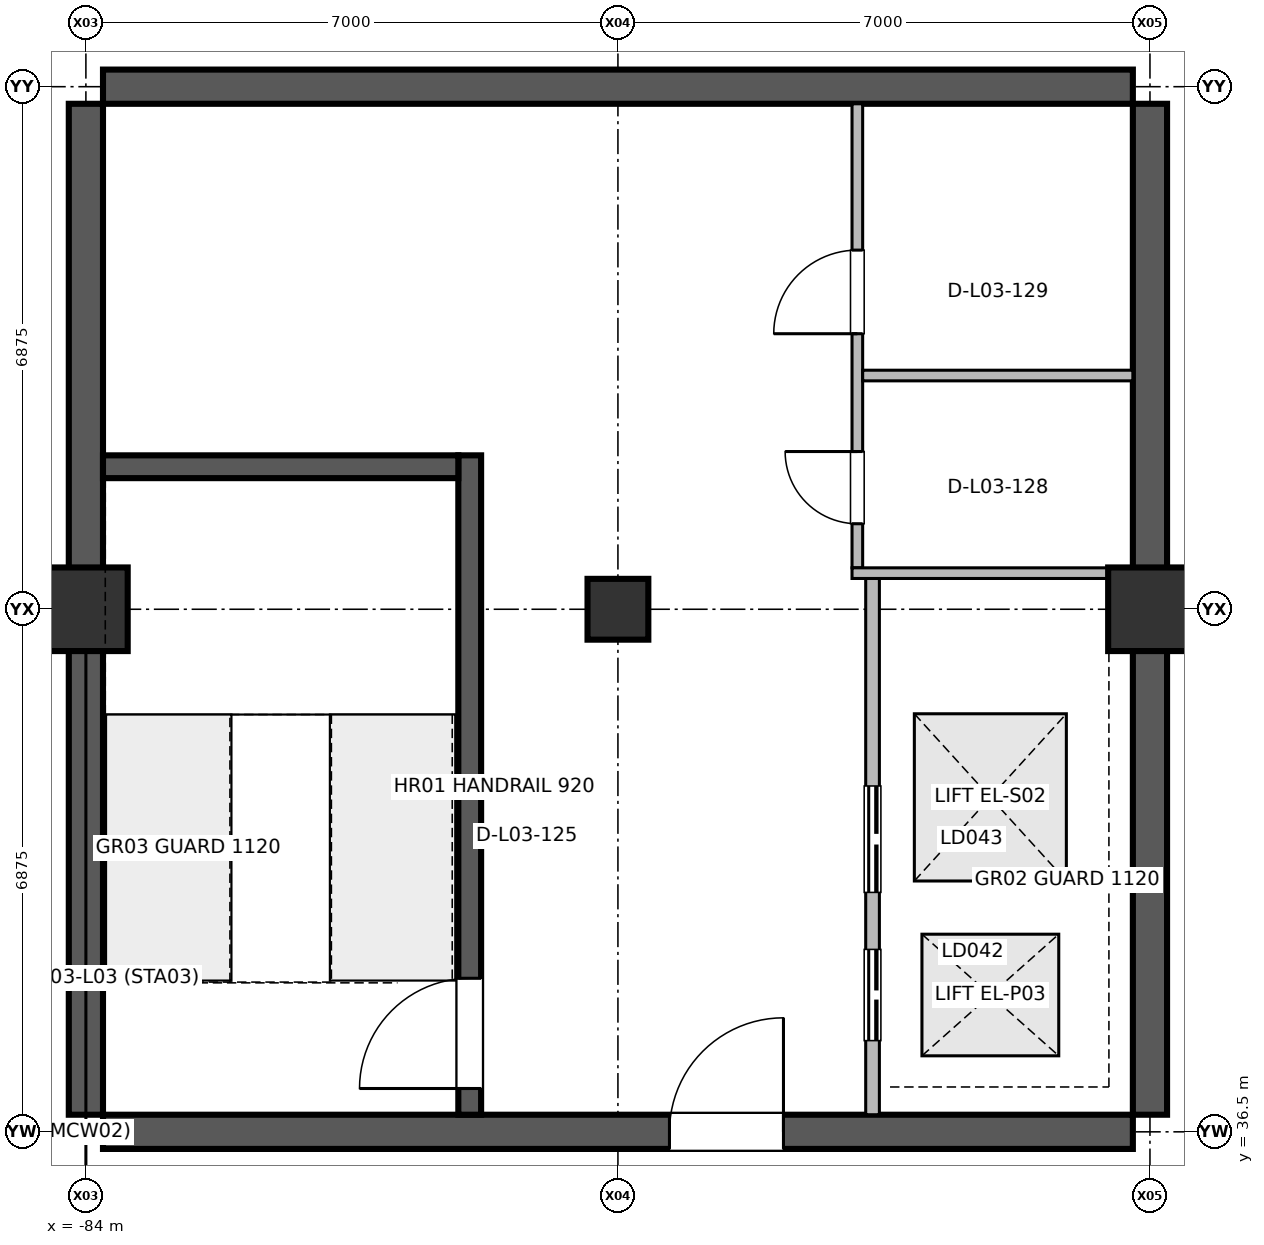
"""IFC4 building model, lengths in metres.
Left out: names, types, materials, properties, quantities, classifications, styles, units other than length and angle.
Written with IfcOpenShell. Run it as: python <this file> out.ifc"""

import sys

from ifc_helpers import new_model, si_unit, direction, frame, frame_2d, origin, origin_2d, place, context, subcontext, project, spatial, rectangle, extrude, element, fill, save


model = new_model("IFC4")
c1 = context("Model", 3, precision=1e-05, world=origin(), true_north=direction((0.0, 1.0)))
c2 = subcontext(c1, "Body", "Model", "MODEL_VIEW")
j1 = project(units=[si_unit("LENGTHUNIT", "METRE"), si_unit("PLANEANGLEUNIT", "RADIAN")], contexts=[c1])
p1 = place(None, origin())
s1 = spatial("IfcSite", under=j1, at=p1, CompositionType="ELEMENT")
p2 = place(p1, origin())
s2 = spatial("IfcBuilding", under=s1, at=p2, CompositionType="ELEMENT")
p3 = place(p2, frame((0.0, 0.0, 11.4)))
s3 = spatial("IfcBuildingStorey", under=s2, at=p3, CompositionType="ELEMENT", Elevation=11.4)
p4 = place(p3, frame((-84.0, 43.375, 0.0), z_axis=(0.0, 0.0, 1.0), x_axis=(1.0, 0.0, 0.0)))
e1 = element("IfcColumn", 1, at=p4, inside=s3, PredefinedType="COLUMN", context=c2, shape_type="SweptSolid", body=[
    extrude(rectangle(XDim=1.1, YDim=1.1, at=origin_2d()), origin(), (0.0, 0.0, 1.0), 4.798),
])
p5 = place(p3, frame((-77.0, 43.375, 0.0), z_axis=(0.0, 0.0, 1.0), x_axis=(1.0, 0.0, 0.0)))
e2 = element("IfcColumn", 2, at=p5, inside=s3, PredefinedType="COLUMN", context=c2, shape_type="SweptSolid", body=[
    extrude(rectangle(XDim=0.8, YDim=0.8, at=origin_2d()), origin(), (0.0, 0.0, 1.0), 4.798),
])
p6 = place(p3, frame((-70.0, 43.375, 0.0), z_axis=(0.0, 0.0, 1.0), x_axis=(1.0, 0.0, 0.0)))
e3 = element("IfcColumn", 3, at=p6, inside=s3, PredefinedType="COLUMN", context=c2, shape_type="SweptSolid", body=[
    extrude(rectangle(XDim=1.1, YDim=1.1, at=origin_2d()), origin(), (0.0, 0.0, 1.0), 4.798),
])
for number, where, z_axis, x_axis in (
    (4, (-84.0, 36.725, 0.0), (0.0, 0.0, 1.0), (0.0, 1.0, 0.0)),
    (5, (-70.0, 36.725, 0.0), (0.0, 0.0, 1.0), (0.0, 1.0, 0.0)),
):
    element("IfcWall", number, at=place(p3, frame(where, z_axis=z_axis, x_axis=x_axis)), inside=s3, PredefinedType="SHEAR", context=c2, shape_type="SweptSolid", body=[
        extrude(rectangle(XDim=13.3, YDim=0.45, at=frame_2d((6.65, 0.0))), origin(), (0.0, 0.0, 1.0), 4.58),
    ])
p7 = place(p3, frame((-83.775, 36.5, 0.0), z_axis=(0.0, 0.0, 1.0), x_axis=(1.0, 0.0, 0.0)))
e6 = element("IfcWall", 6, at=p7, inside=s3, PredefinedType="SHEAR", context=c2, shape_type="SweptSolid", body=[
    extrude(rectangle(XDim=13.55, YDim=0.45, at=frame_2d((6.775, 0.0))), origin(), (0.0, 0.0, 1.0), 4.58),
])
p8 = place(p7, frame((7.453, 0.0, 0.0)))
e7 = element("IfcOpeningElement", 7, at=p8, cuts=e6, PredefinedType="OPENING", context=c2, shape_type="SweptSolid", body=[
    extrude(rectangle(XDim=1.5, YDim=2.2, at=frame_2d((0.75, 1.1))), frame((0.0, 0.235, 0.0), z_axis=(0.0, -1.0, 0.0), x_axis=(1.0, 0.0, 0.0)), (0.0, 0.0, 1.0), 0.47),
])
p9 = place(p3, frame((-83.775, 50.25, 0.0), z_axis=(0.0, 0.0, 1.0), x_axis=(1.0, 0.0, 0.0)))
e8 = element("IfcWall", 8, at=p9, inside=s3, PredefinedType="SHEAR", context=c2, shape_type="SweptSolid", body=[
    extrude(rectangle(XDim=13.55, YDim=0.45, at=frame_2d((6.775, 0.0))), origin(), (0.0, 0.0, 1.0), 4.58),
])
p10 = place(p3, frame((-78.95, 36.725, 0.0), z_axis=(0.0, 0.0, 1.0), x_axis=(0.0, 1.0, 0.0)))
e9 = element("IfcWall", 9, at=p10, inside=s3, PredefinedType="SHEAR", context=c2, shape_type="SweptSolid", body=[
    extrude(rectangle(XDim=8.675, YDim=0.3, at=frame_2d((4.337, 0.0))), origin(), (0.0, 0.0, 1.0), 4.58),
])
p11 = place(p10, frame((0.345, 0.0, 0.0)))
e10 = element("IfcOpeningElement", 10, at=p11, cuts=e9, PredefinedType="OPENING", context=c2, shape_type="SweptSolid", body=[
    extrude(rectangle(XDim=1.45, YDim=2.2, at=frame_2d((0.725, 1.1))), frame((0.0, 0.16, 0.0), z_axis=(0.0, -1.0, 0.0), x_axis=(1.0, 0.0, 0.0)), (0.0, 0.0, 1.0), 0.32),
])
p12 = place(p3, frame((-73.65, 36.725, 0.0), z_axis=(0.0, 0.0, 1.0), x_axis=(0.0, 1.0, 0.0)))
e11 = element("IfcWall", 11, at=p12, inside=s3, PredefinedType="PARTITIONING", context=c2, shape_type="SweptSolid", body=[
    extrude(rectangle(XDim=7.055, YDim=0.18, at=frame_2d((3.527, 0.0))), origin(), (0.0, 0.0, 1.0), 3.805),
])
p13 = place(p12, frame((0.975, 0.0, 0.0)))
e12 = element("IfcOpeningElement", 12, at=p13, cuts=e11, PredefinedType="OPENING", context=c2, shape_type="SweptSolid", body=[
    extrude(rectangle(XDim=1.2, YDim=2.25, at=frame_2d((0.6, 1.125))), frame((0.0, 0.1, 0.0), z_axis=(0.0, -1.0, 0.0), x_axis=(1.0, 0.0, 0.0)), (0.0, 0.0, 1.0), 0.2),
])
p14 = place(p12, frame((2.925, 0.0, 0.0)))
e13 = element("IfcOpeningElement", 13, at=p14, cuts=e11, PredefinedType="OPENING", context=c2, shape_type="SweptSolid", body=[
    extrude(rectangle(XDim=1.4, YDim=2.3, at=frame_2d((0.7, 1.15))), frame((0.0, 0.1, 0.0), z_axis=(0.0, -1.0, 0.0), x_axis=(1.0, 0.0, 0.0)), (0.0, 0.0, 1.0), 0.2),
])
p15 = place(p3, frame((-73.85, 43.92, 0.0), z_axis=(0.0, 0.0, 1.0), x_axis=(0.0, 1.0, 0.0)))
e14 = element("IfcWall", 14, at=p15, inside=s3, PredefinedType="PARTITIONING", context=c2, shape_type="SweptSolid", body=[
    extrude(rectangle(XDim=6.105, YDim=0.14, at=frame_2d((3.052, 0.0))), origin(), (0.0, 0.0, 1.0), 3.82),
])
p16 = place(p15, frame((0.58, 0.0, 0.0)))
e15 = element("IfcOpeningElement", 15, at=p16, cuts=e14, PredefinedType="OPENING", context=c2, shape_type="SweptSolid", body=[
    extrude(rectangle(XDim=0.95, YDim=2.15, at=frame_2d((0.475, 1.075))), frame((0.0, 0.08, 0.0), z_axis=(0.0, -1.0, 0.0), x_axis=(1.0, 0.0, 0.0)), (0.0, 0.0, 1.0), 0.16),
])
p17 = place(p15, frame((3.08, 0.0, 0.0)))
e16 = element("IfcOpeningElement", 16, at=p17, cuts=e14, PredefinedType="OPENING", context=c2, shape_type="SweptSolid", body=[
    extrude(rectangle(XDim=1.1, YDim=2.15, at=frame_2d((0.55, 1.075))), frame((0.0, 0.08, 0.0), z_axis=(0.0, -1.0, 0.0), x_axis=(1.0, 0.0, 0.0)), (0.0, 0.0, 1.0), 0.16),
])
p18 = place(p3, frame((-73.92, 43.85, 0.0), z_axis=(0.0, 0.0, 1.0), x_axis=(1.0, 0.0, 0.0)))
e17 = element("IfcWall", 17, at=p18, inside=s3, PredefinedType="PARTITIONING", context=c2, shape_type="SweptSolid", body=[
    extrude(rectangle(XDim=3.695, YDim=0.14, at=frame_2d((1.847, 0.0))), origin(), (0.0, 0.0, 1.0), 3.82),
])
p19 = place(p3, frame((-73.78, 46.45, 0.0), z_axis=(0.0, 0.0, 1.0), x_axis=(1.0, 0.0, 0.0)))
e18 = element("IfcWall", 18, at=p19, inside=s3, PredefinedType="PARTITIONING", context=c2, shape_type="SweptSolid", body=[
    extrude(rectangle(XDim=3.555, YDim=0.14, at=frame_2d((1.777, 0.0))), origin(), (0.0, 0.0, 1.0), 3.82),
])
p20 = place(p3, frame((-83.775, 45.25, 0.0), z_axis=(0.0, 0.0, 1.0), x_axis=(1.0, 0.0, 0.0)))
e19 = element("IfcWall", 19, at=p20, inside=s3, PredefinedType="SHEAR", context=c2, shape_type="SweptSolid", body=[
    extrude(rectangle(XDim=4.675, YDim=0.3, at=frame_2d((2.337, 0.0))), origin(), (0.0, 0.0, 1.0), 4.58),
])
p21 = place(p8, origin())
e20 = element("IfcDoor", 20, at=p21, inside=s3, OperationType="SINGLE_SWING_RIGHT", PredefinedType="DOOR", context=c2, shape_type="SweptSolid", body=[
    extrude(rectangle(XDim=1.5, YDim=2.2, at=frame_2d((0.75, 1.1))), frame((0.0, 0.025, 0.0), z_axis=(0.0, -1.0, 0.0), x_axis=(1.0, 0.0, 0.0)), (0.0, 0.0, 1.0), 0.05),
])
fill(e7, e20)
p22 = place(p11, origin())
e21 = element("IfcDoor", 21, at=p22, inside=s3, OperationType="SINGLE_SWING_LEFT", PredefinedType="DOOR", context=c2, shape_type="SweptSolid", body=[
    extrude(rectangle(XDim=1.45, YDim=2.2, at=frame_2d((0.725, 1.1))), frame((0.0, 0.025, 0.0), z_axis=(0.0, -1.0, 0.0), x_axis=(1.0, 0.0, 0.0)), (0.0, 0.0, 1.0), 0.05),
])
fill(e10, e21)
p23 = place(p13, origin())
e22 = element("IfcDoor", 22, at=p23, inside=s3, OperationType="DOUBLE_DOOR_SLIDING", PredefinedType="DOOR", context=c2, shape_type="SweptSolid", body=[
    extrude(rectangle(XDim=1.2, YDim=2.25, at=frame_2d((0.6, 1.125))), frame((0.0, 0.025, 0.0), z_axis=(0.0, -1.0, 0.0), x_axis=(1.0, 0.0, 0.0)), (0.0, 0.0, 1.0), 0.05),
])
fill(e12, e22)
p24 = place(p14, origin())
e23 = element("IfcDoor", 23, at=p24, inside=s3, OperationType="DOUBLE_DOOR_SLIDING", PredefinedType="DOOR", context=c2, shape_type="SweptSolid", body=[
    extrude(rectangle(XDim=1.4, YDim=2.3, at=frame_2d((0.7, 1.15))), frame((0.0, 0.025, 0.0), z_axis=(0.0, -1.0, 0.0), x_axis=(1.0, 0.0, 0.0)), (0.0, 0.0, 1.0), 0.05),
])
fill(e13, e23)
p25 = place(p16, origin())
e24 = element("IfcDoor", 24, at=p25, inside=s3, OperationType="SINGLE_SWING_RIGHT", PredefinedType="DOOR", context=c2, shape_type="SweptSolid", body=[
    extrude(rectangle(XDim=0.95, YDim=2.15, at=frame_2d((0.475, 1.075))), frame((0.0, 0.025, 0.0), z_axis=(0.0, -1.0, 0.0), x_axis=(1.0, 0.0, 0.0)), (0.0, 0.0, 1.0), 0.05),
])
fill(e15, e24)
p26 = place(p17, origin())
e25 = element("IfcDoor", 25, at=p26, inside=s3, OperationType="SINGLE_SWING_LEFT", PredefinedType="DOOR", context=c2, shape_type="SweptSolid", body=[
    extrude(rectangle(XDim=1.1, YDim=2.15, at=frame_2d((0.55, 1.075))), frame((0.0, 0.025, 0.0), z_axis=(0.0, -1.0, 0.0), x_axis=(1.0, 0.0, 0.0)), (0.0, 0.0, 1.0), 0.05),
])
fill(e16, e25)
save(model, sys.argv[1])
